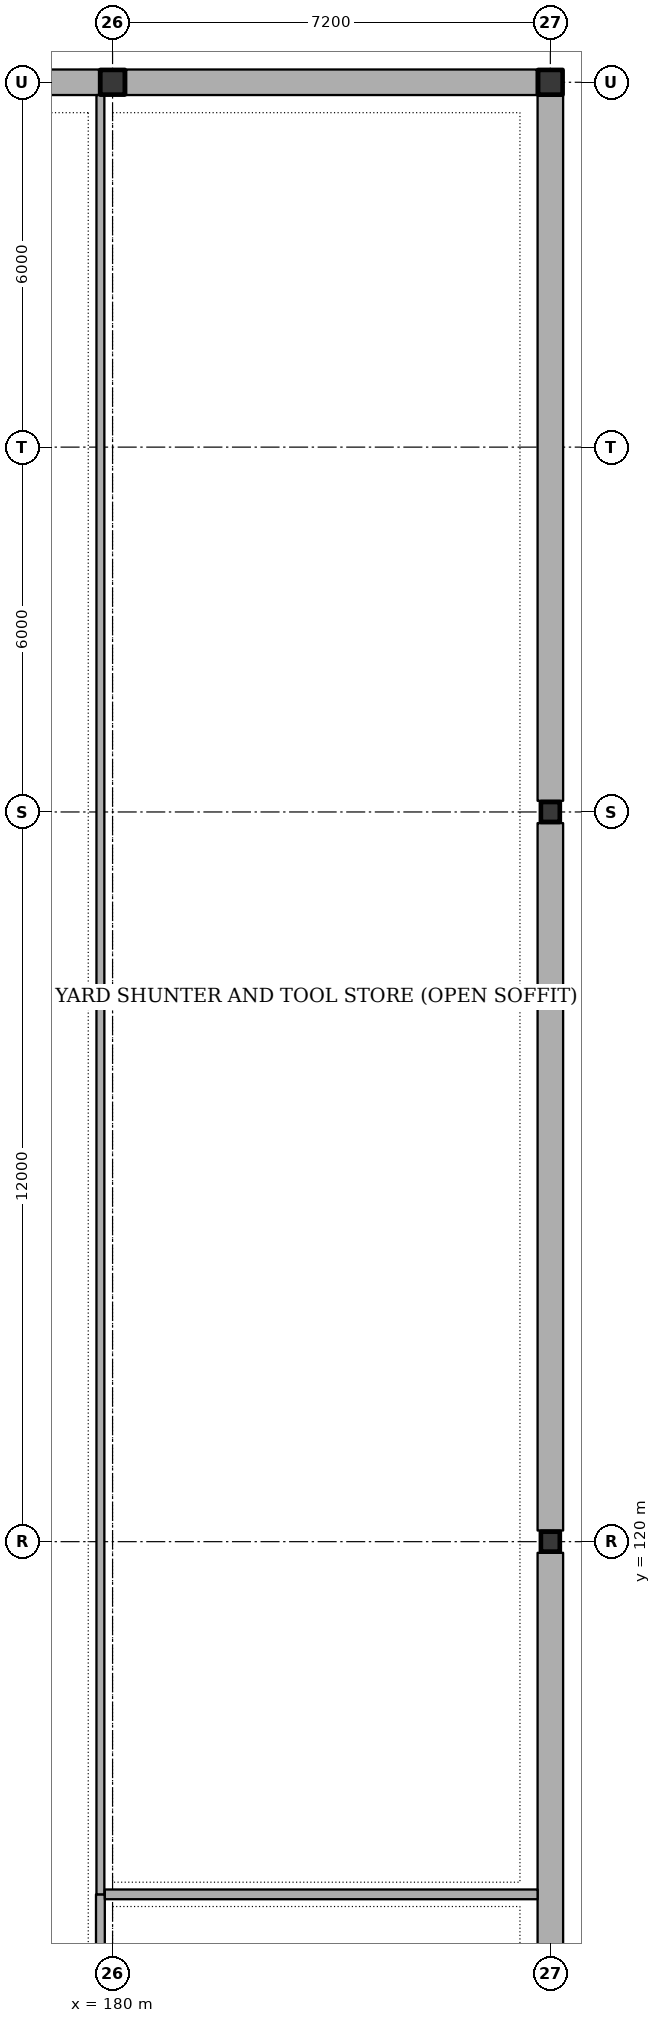
"""IFC4 building model, lengths in metres.
Left out: names, types, materials, properties, quantities, classifications, styles, units other than length and angle.
Written with IfcOpenShell. Run it as: python <this file> out.ifc"""

import sys

from ifc_helpers import new_model, si_unit, direction, frame, frame_2d, origin, origin_2d, place, context, subcontext, project, spatial, rectangle, i_section, extrude, element, fill, save


model = new_model("IFC4")
c1 = context("Model", 3, precision=1e-05, world=origin(), true_north=direction((0.0, 1.0)))
c2 = subcontext(c1, "Body", "Model", "MODEL_VIEW")
j1 = project(units=[si_unit("LENGTHUNIT", "METRE"), si_unit("PLANEANGLEUNIT", "RADIAN")], contexts=[c1])
p1 = place(None, origin())
s1 = spatial("IfcSite", under=j1, at=p1, CompositionType="ELEMENT")
p2 = place(p1, origin())
s2 = spatial("IfcBuilding", under=s1, at=p2, CompositionType="ELEMENT")
p3 = place(p2, origin())
s3 = spatial("IfcBuildingStorey", under=s2, at=p3, CompositionType="ELEMENT", Elevation=0.0)
p4 = place(p3, frame((180.0, 144.0, -0.3), z_axis=(0.0, 0.0, 1.0), x_axis=(1.0, 0.0, 0.0)))
e1 = element("IfcColumn", 1, at=p4, inside=s3, PredefinedType="COLUMN", context=c2, shape_type="SweptSolid", body=[
    extrude(i_section(OverallWidth=0.403, OverallDepth=0.406, WebThickness=0.027, FlangeThickness=0.043, FilletRadius=0.015, at=origin_2d()), origin(), (0.0, 0.0, 1.0), 11.7),
])
for number, where, z_axis, x_axis in (
    (2, (187.2, 120.0, -0.3), (0.0, 0.0, 1.0), (1.0, 0.0, 0.0)),
    (3, (187.2, 132.0, -0.3), (0.0, 0.0, 1.0), (1.0, 0.0, 0.0)),
):
    element("IfcColumn", number, at=place(p3, frame(where, z_axis=z_axis, x_axis=x_axis)), inside=s3, PredefinedType="COLUMN", context=c2, shape_type="SweptSolid", body=[
        extrude(i_section(OverallWidth=0.311, OverallDepth=0.327, WebThickness=0.016, FlangeThickness=0.025, FilletRadius=0.015, at=origin_2d()), origin(), (0.0, 0.0, 1.0), 11.7),
    ])
p5 = place(p3, frame((187.2, 144.0, -0.3), z_axis=(0.0, 0.0, 1.0), x_axis=(1.0, 0.0, 0.0)))
e4 = element("IfcColumn", 4, at=p5, inside=s3, PredefinedType="COLUMN", context=c2, shape_type="SweptSolid", body=[
    extrude(i_section(OverallWidth=0.403, OverallDepth=0.406, WebThickness=0.027, FlangeThickness=0.043, FilletRadius=0.015, at=origin_2d()), origin(), (0.0, 0.0, 1.0), 11.7),
])
for number, where, z_axis, x_axis in (
    (5, (173.023, 144.0, 0.0), (0.0, 0.0, 1.0), (1.0, 0.0, 0.0)),
    (6, (180.223, 144.0, 0.0), (0.0, 0.0, 1.0), (1.0, 0.0, 0.0)),
):
    element("IfcWall", number, at=place(p3, frame(where, z_axis=z_axis, x_axis=x_axis)), inside=s3, PredefinedType="SOLIDWALL", context=c2, shape_type="SweptSolid", body=[
        extrude(rectangle(XDim=6.754, YDim=0.42, at=frame_2d((3.377, 0.0))), origin(), (0.0, 0.0, 1.0), 5.443),
    ])
p6 = place(p3, frame((187.2, 119.816, 0.0), z_axis=(0.0, 0.0, 1.0), x_axis=(0.0, -1.0, 0.0)))
e7 = element("IfcWall", 7, at=p6, inside=s3, PredefinedType="SOLIDWALL", context=c2, shape_type="SweptSolid", body=[
    extrude(rectangle(XDim=11.633, YDim=0.42, at=frame_2d((5.816, 0.0))), origin(), (0.0, 0.0, 1.0), 6.6),
])
p7 = place(p6, frame((1.3, 0.0, 0.0)))
e8 = element("IfcOpeningElement", 8, at=p7, cuts=e7, PredefinedType="OPENING", context=c2, shape_type="SweptSolid", body=[
    extrude(rectangle(XDim=3.8, YDim=5.6, at=frame_2d((1.9, 2.8))), frame((0.0, 0.22, 0.0), z_axis=(0.0, -1.0, 0.0), x_axis=(1.0, 0.0, 0.0)), (0.0, 0.0, 1.0), 0.44),
])
p8 = place(p6, frame((6.533, 0.0, 0.0)))
e9 = element("IfcOpeningElement", 9, at=p8, cuts=e7, PredefinedType="OPENING", context=c2, shape_type="SweptSolid", body=[
    extrude(rectangle(XDim=3.8, YDim=5.6, at=frame_2d((1.9, 2.8))), frame((0.0, 0.22, 0.0), z_axis=(0.0, -1.0, 0.0), x_axis=(1.0, 0.0, 0.0)), (0.0, 0.0, 1.0), 0.44),
])
p9 = place(p3, frame((187.2, 131.816, 0.0), z_axis=(0.0, 0.0, 1.0), x_axis=(0.0, -1.0, 0.0)))
e10 = element("IfcWall", 10, at=p9, inside=s3, PredefinedType="SOLIDWALL", context=c2, shape_type="SweptSolid", body=[
    extrude(rectangle(XDim=11.633, YDim=0.42, at=frame_2d((5.816, 0.0))), origin(), (0.0, 0.0, 1.0), 6.6),
])
p10 = place(p9, frame((1.3, 0.0, 0.0)))
e11 = element("IfcOpeningElement", 11, at=p10, cuts=e10, PredefinedType="OPENING", context=c2, shape_type="SweptSolid", body=[
    extrude(rectangle(XDim=3.95, YDim=5.7, at=frame_2d((1.975, 2.85))), frame((0.0, 0.22, 0.0), z_axis=(0.0, -1.0, 0.0), x_axis=(1.0, 0.0, 0.0)), (0.0, 0.0, 1.0), 0.44),
])
p11 = place(p9, frame((6.383, 0.0, 0.0)))
e12 = element("IfcOpeningElement", 12, at=p11, cuts=e10, PredefinedType="OPENING", context=c2, shape_type="SweptSolid", body=[
    extrude(rectangle(XDim=3.95, YDim=5.7, at=frame_2d((1.975, 2.85))), frame((0.0, 0.22, 0.0), z_axis=(0.0, -1.0, 0.0), x_axis=(1.0, 0.0, 0.0)), (0.0, 0.0, 1.0), 0.44),
])
p12 = place(p3, frame((187.2, 143.777, 0.0), z_axis=(0.0, 0.0, 1.0), x_axis=(0.0, -1.0, 0.0)))
e13 = element("IfcWall", 13, at=p12, inside=s3, PredefinedType="SOLIDWALL", context=c2, shape_type="SweptSolid", body=[
    extrude(rectangle(XDim=11.593, YDim=0.42, at=frame_2d((5.797, 0.0))), origin(), (0.0, 0.0, 1.0), 5.443),
])
p13 = place(p12, frame((1.3, 0.0, 0.0)))
e14 = element("IfcOpeningElement", 14, at=p13, cuts=e13, PredefinedType="OPENING", context=c2, shape_type="SweptSolid", body=[
    extrude(rectangle(XDim=3.8, YDim=5.6, at=frame_2d((1.9, 2.8))), frame((0.0, 0.22, 0.0), z_axis=(0.0, -1.0, 0.0), x_axis=(1.0, 0.0, 0.0)), (0.0, 0.0, 1.0), 0.44),
])
p14 = place(p12, frame((6.493, 0.0, 0.0)))
e15 = element("IfcOpeningElement", 15, at=p14, cuts=e13, PredefinedType="OPENING", context=c2, shape_type="SweptSolid", body=[
    extrude(rectangle(XDim=3.8, YDim=5.6, at=frame_2d((1.9, 2.8))), frame((0.0, 0.22, 0.0), z_axis=(0.0, -1.0, 0.0), x_axis=(1.0, 0.0, 0.0)), (0.0, 0.0, 1.0), 0.44),
])
p15 = place(p3, frame((179.8, 84.205, 0.0), z_axis=(0.0, 0.0, 1.0), x_axis=(0.0, 1.0, 0.0)))
e16 = element("IfcWall", 16, at=p15, inside=s3, PredefinedType="PARTITIONING", context=c2, shape_type="SweptSolid", body=[
    extrude(rectangle(XDim=29.995, YDim=0.145, at=frame_2d((14.998, 0.0))), origin(), (0.0, 0.0, 1.0), 3.55),
])
p16 = place(p15, frame((17.609, 0.0, 0.0)))
e17 = element("IfcOpeningElement", 17, at=p16, cuts=e16, PredefinedType="OPENING", context=c2, shape_type="SweptSolid", body=[
    extrude(rectangle(XDim=1.75, YDim=2.25, at=frame_2d((0.875, 1.125))), frame((0.0, 0.083, 0.0), z_axis=(0.0, -1.0, 0.0), x_axis=(1.0, 0.0, 0.0)), (0.0, 0.0, 1.0), 0.165),
])
p17 = place(p3, frame((179.8, 114.2, 0.0), z_axis=(0.0, 0.0, 1.0), x_axis=(0.0, 1.0, 0.0)))
e18 = element("IfcWall", 18, at=p17, inside=s3, PredefinedType="PARTITIONING", context=c2, shape_type="SweptSolid", body=[
    extrude(rectangle(XDim=29.59, YDim=0.13, at=frame_2d((14.795, 0.0))), origin(), (0.0, 0.0, 1.0), 3.55),
])
p18 = place(p17, frame((10.711, 0.0, 0.0)))
e19 = element("IfcOpeningElement", 19, at=p18, cuts=e18, PredefinedType="OPENING", context=c2, shape_type="SweptSolid", body=[
    extrude(rectangle(XDim=1.15, YDim=2.15, at=frame_2d((0.575, 1.075))), frame((0.0, 0.075, 0.0), z_axis=(0.0, -1.0, 0.0), x_axis=(1.0, 0.0, 0.0)), (0.0, 0.0, 1.0), 0.15),
])
p19 = place(p3, frame((179.873, 114.2, 0.0), z_axis=(0.0, 0.0, 1.0), x_axis=(1.0, 0.0, 0.0)))
e20 = element("IfcWall", 20, at=p19, inside=s3, PredefinedType="PARTITIONING", context=c2, shape_type="SweptSolid", body=[
    extrude(rectangle(XDim=7.117, YDim=0.16, at=frame_2d((3.559, 0.0))), origin(), (0.0, 0.0, 1.0), 3.55),
])
p20 = place(p7, origin())
e21 = element("IfcDoor", 21, at=p20, inside=s3, OperationType="FOLDING_TO_LEFT", PredefinedType="GATE", context=c2, shape_type="SweptSolid", body=[
    extrude(rectangle(XDim=3.8, YDim=5.6, at=frame_2d((1.9, 2.8))), frame((0.0, 0.025, 0.0), z_axis=(0.0, -1.0, 0.0), x_axis=(1.0, 0.0, 0.0)), (0.0, 0.0, 1.0), 0.05),
])
fill(e8, e21)
p21 = place(p10, origin())
e22 = element("IfcDoor", 22, at=p21, inside=s3, OperationType="FOLDING_TO_LEFT", PredefinedType="GATE", context=c2, shape_type="SweptSolid", body=[
    extrude(rectangle(XDim=3.95, YDim=5.7, at=frame_2d((1.975, 2.85))), frame((0.0, 0.025, 0.0), z_axis=(0.0, -1.0, 0.0), x_axis=(1.0, 0.0, 0.0)), (0.0, 0.0, 1.0), 0.05),
])
fill(e11, e22)
p22 = place(p11, origin())
e23 = element("IfcDoor", 23, at=p22, inside=s3, OperationType="FOLDING_TO_LEFT", PredefinedType="GATE", context=c2, shape_type="SweptSolid", body=[
    extrude(rectangle(XDim=3.95, YDim=5.7, at=frame_2d((1.975, 2.85))), frame((0.0, 0.025, 0.0), z_axis=(0.0, -1.0, 0.0), x_axis=(1.0, 0.0, 0.0)), (0.0, 0.0, 1.0), 0.05),
])
fill(e12, e23)
p23 = place(p13, origin())
e24 = element("IfcDoor", 24, at=p23, inside=s3, OperationType="FOLDING_TO_LEFT", PredefinedType="GATE", context=c2, shape_type="SweptSolid", body=[
    extrude(rectangle(XDim=3.8, YDim=5.6, at=frame_2d((1.9, 2.8))), frame((0.0, 0.025, 0.0), z_axis=(0.0, -1.0, 0.0), x_axis=(1.0, 0.0, 0.0)), (0.0, 0.0, 1.0), 0.05),
])
fill(e14, e24)
p24 = place(p14, origin())
e25 = element("IfcDoor", 25, at=p24, inside=s3, OperationType="FOLDING_TO_LEFT", PredefinedType="GATE", context=c2, shape_type="SweptSolid", body=[
    extrude(rectangle(XDim=3.8, YDim=5.6, at=frame_2d((1.9, 2.8))), frame((0.0, 0.025, 0.0), z_axis=(0.0, -1.0, 0.0), x_axis=(1.0, 0.0, 0.0)), (0.0, 0.0, 1.0), 0.05),
])
fill(e15, e25)
p25 = place(p18, origin())
e26 = element("IfcDoor", 26, at=p25, inside=s3, OperationType="SINGLE_SWING_LEFT", PredefinedType="DOOR", context=c2, shape_type="SweptSolid", body=[
    extrude(rectangle(XDim=1.15, YDim=2.15, at=frame_2d((0.575, 1.075))), frame((0.0, 0.025, 0.0), z_axis=(0.0, -1.0, 0.0), x_axis=(1.0, 0.0, 0.0)), (0.0, 0.0, 1.0), 0.05),
])
fill(e19, e26)
save(model, sys.argv[1])
